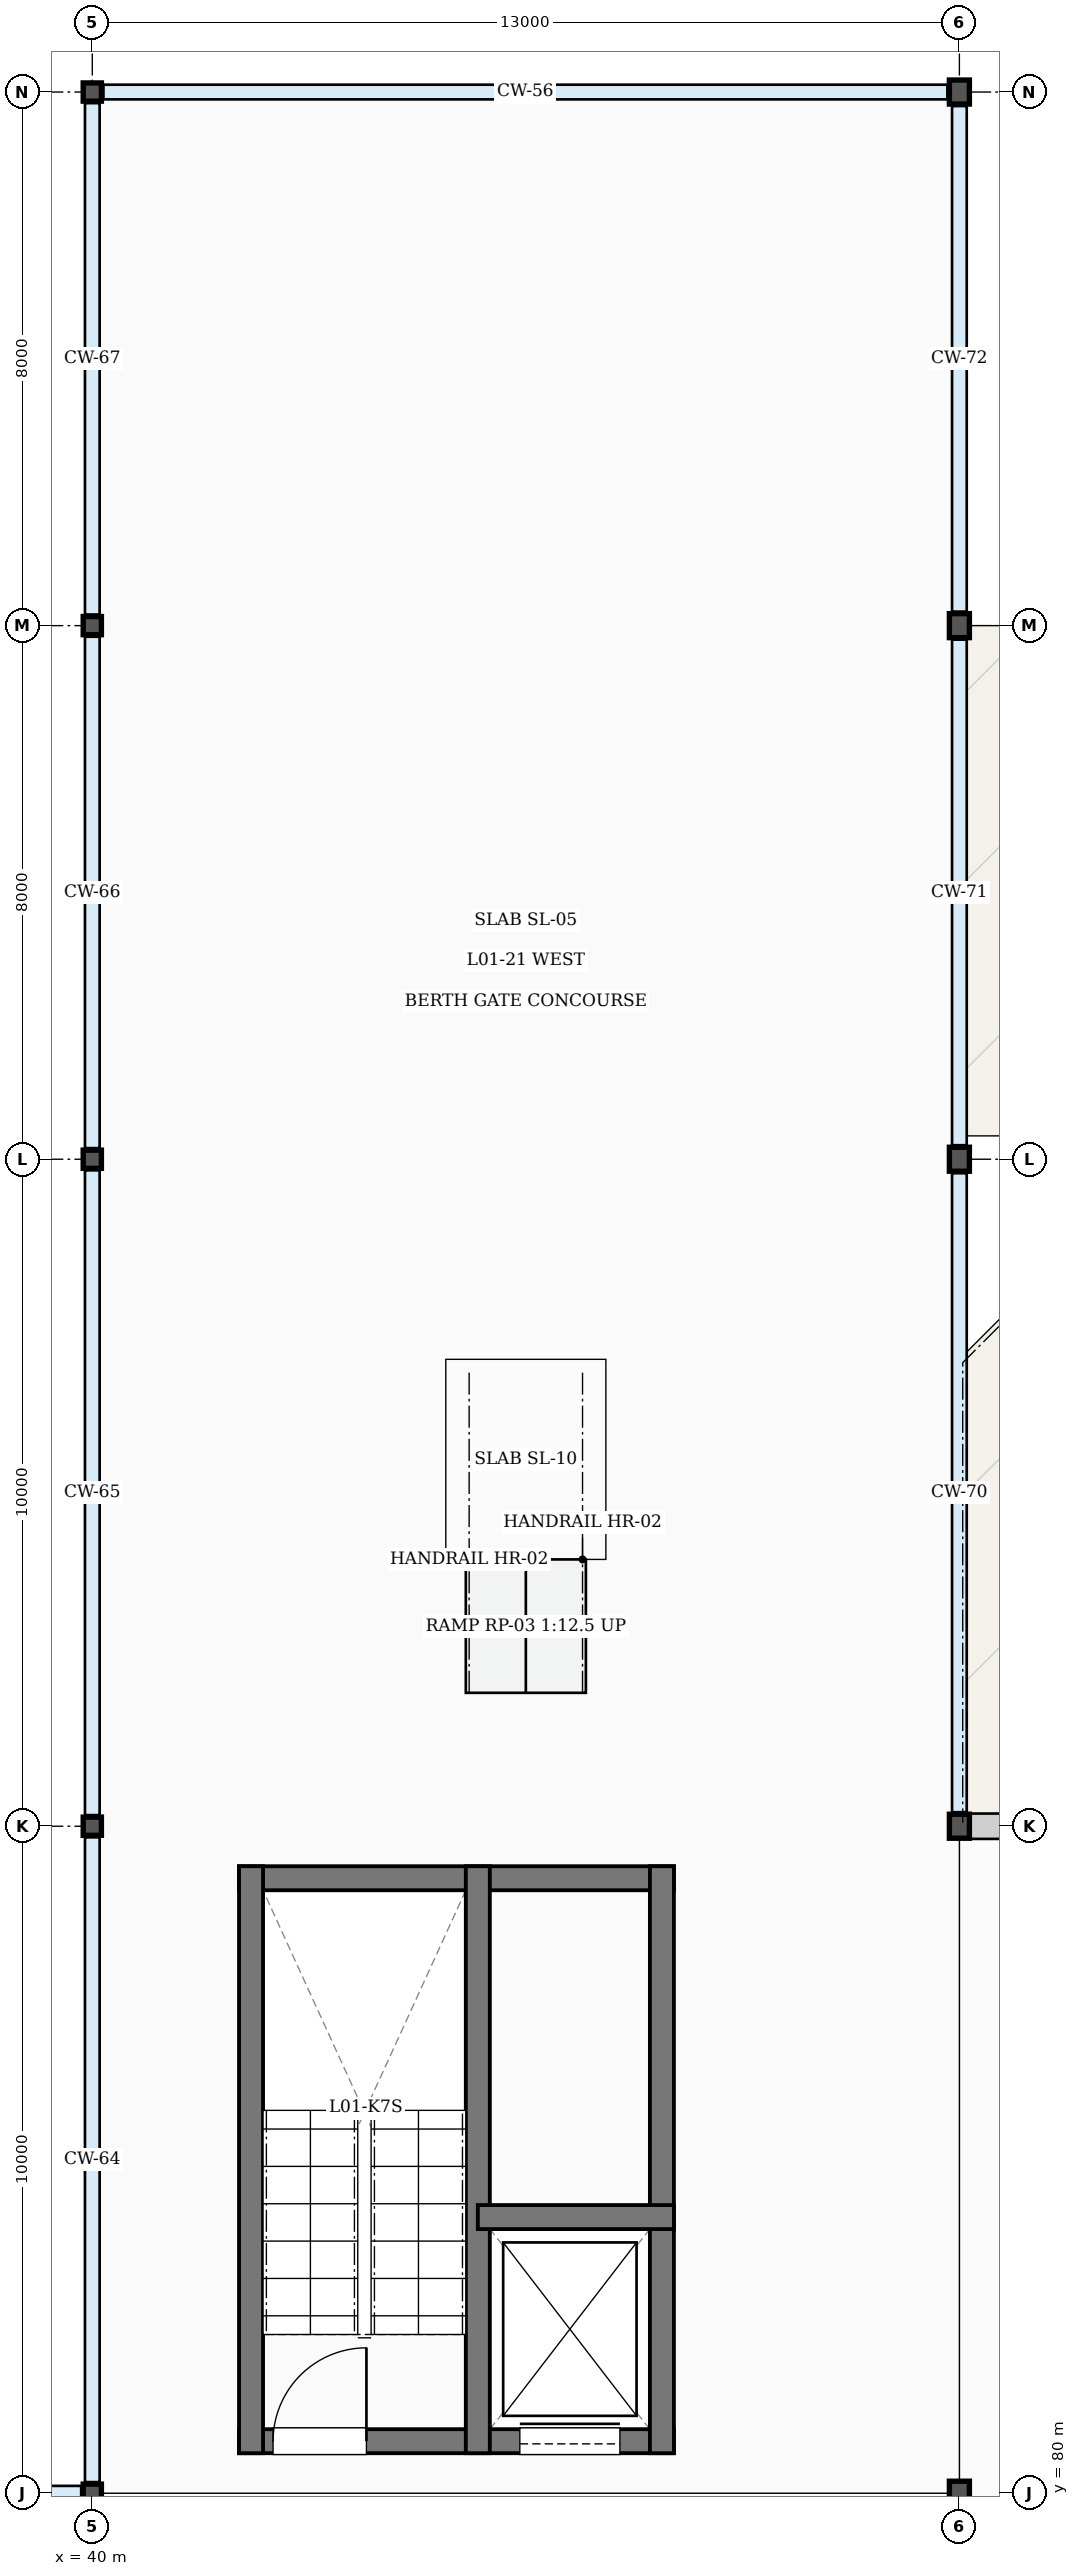
"""IFC4 building model, lengths in metres.
Left out: names, types, materials, properties, quantities, classifications, styles, units other than length and angle.
Written with IfcOpenShell. Run it as: python <this file> out.ifc"""

import sys

from ifc_helpers import new_model, si_unit, direction, frame, frame_2d, origin, origin_2d, place, context, subcontext, project, spatial, rectangle, hollow_circle, i_section, extrude, element, fill, save


model = new_model("IFC4")
c1 = context("Model", 3, precision=1e-05, world=origin(), true_north=direction((0.0, 1.0)))
c2 = subcontext(c1, "Body", "Model", "MODEL_VIEW")
j1 = project(units=[si_unit("LENGTHUNIT", "METRE"), si_unit("PLANEANGLEUNIT", "RADIAN")], contexts=[c1])
p1 = place(None, origin())
s1 = spatial("IfcSite", under=j1, at=p1, CompositionType="ELEMENT")
p2 = place(p1, origin())
s2 = spatial("IfcBuilding", under=s1, at=p2, CompositionType="ELEMENT")
p3 = place(p2, frame((0.0, 0.0, 5.4)))
s3 = spatial("IfcBuildingStorey", under=s2, at=p3, CompositionType="ELEMENT", Elevation=5.4)
for number, where, z_axis, x_axis in (
    (1, (40.0, 80.0, 0.0), (0.0, 0.0, 1.0), (1.0, 0.0, 0.0)),
    (2, (40.0, 90.0, 0.0), (0.0, 0.0, 1.0), (1.0, 0.0, 0.0)),
    (3, (40.0, 100.0, 0.0), (0.0, 0.0, 1.0), (1.0, 0.0, 0.0)),
    (4, (40.0, 108.0, 0.0), (0.0, 0.0, 1.0), (1.0, 0.0, 0.0)),
    (5, (40.0, 116.0, 0.0), (0.0, 0.0, 1.0), (1.0, 0.0, 0.0)),
):
    element("IfcColumn", number, at=place(p3, frame(where, z_axis=z_axis, x_axis=x_axis)), inside=s3, PredefinedType="COLUMN", context=c2, shape_type="SweptSolid", body=[
        extrude(hollow_circle(Radius=0.136, WallThickness=0.012, at=origin_2d()), origin(), (0.0, 0.0, 1.0), 4.8),
    ])
for number, where, z_axis, x_axis in (
    (6, (53.0, 80.0, 0.0), (0.0, 0.0, 1.0), (1.0, 0.0, 0.0)),
    (7, (53.0, 90.0, 0.0), (0.0, 0.0, 1.0), (1.0, 0.0, 0.0)),
    (8, (53.0, 100.0, 0.0), (0.0, 0.0, 1.0), (1.0, 0.0, 0.0)),
    (9, (53.0, 108.0, 0.0), (0.0, 0.0, 1.0), (1.0, 0.0, 0.0)),
    (10, (53.0, 116.0, 0.0), (0.0, 0.0, 1.0), (1.0, 0.0, 0.0)),
):
    element("IfcColumn", number, at=place(p3, frame(where, z_axis=z_axis, x_axis=x_axis)), inside=s3, PredefinedType="COLUMN", context=c2, shape_type="SweptSolid", body=[
        extrude(i_section(OverallWidth=0.3, OverallDepth=0.36, WebThickness=0.012, FlangeThickness=0.022, FilletRadius=0.027, at=origin_2d()), origin(), (0.0, 0.0, 1.0), 4.8),
    ])
p4 = place(p3, frame((53.15, 90.0, 0.0), z_axis=(0.0, 0.0, 1.0), x_axis=(1.0, 0.0, 0.0)))
e11 = element("IfcWall", 11, at=p4, inside=s3, PredefinedType="SOLIDWALL", context=c2, shape_type="SweptSolid", body=[
    extrude(rectangle(XDim=9.7, YDim=0.38, at=frame_2d((4.85, 0.0))), origin(), (0.0, 0.0, 1.0), 3.87),
])
p5 = place(p4, frame((3.95, 0.0, 0.0)))
e12 = element("IfcOpeningElement", 12, at=p5, cuts=e11, PredefinedType="OPENING", context=c2, shape_type="SweptSolid", body=[
    extrude(rectangle(XDim=1.8, YDim=2.35, at=frame_2d((0.9, 1.175))), frame((0.0, 0.2, 0.0), z_axis=(0.0, -1.0, 0.0), x_axis=(1.0, 0.0, 0.0)), (0.0, 0.0, 1.0), 0.4),
])
p6 = place(p3, frame((42.2, 80.78, 0.0), z_axis=(0.0, 0.0, 1.0), x_axis=(1.0, 0.0, 0.0)))
e13 = element("IfcWall", 13, at=p6, inside=s3, PredefinedType="SHEAR", context=c2, shape_type="SweptSolid", body=[
    extrude(rectangle(XDim=6.52, YDim=0.36, at=frame_2d((3.26, 0.0))), origin(), (0.0, 0.0, 1.0), 4.8),
])
p7 = place(p6, frame((0.51, 0.0, 0.0)))
e14 = element("IfcOpeningElement", 14, at=p7, cuts=e13, PredefinedType="OPENING", context=c2, shape_type="SweptSolid", body=[
    extrude(rectangle(XDim=1.4, YDim=2.35, at=frame_2d((0.7, 1.175))), frame((0.0, 0.19, 0.0), z_axis=(0.0, -1.0, 0.0), x_axis=(1.0, 0.0, 0.0)), (0.0, 0.0, 1.0), 0.38),
])
p8 = place(p6, frame((4.21, 0.0, 0.0)))
e15 = element("IfcOpeningElement", 15, at=p8, cuts=e13, PredefinedType="OPENING", context=c2, shape_type="SweptSolid", body=[
    extrude(rectangle(XDim=1.5, YDim=2.4, at=frame_2d((0.75, 1.2))), frame((0.0, 0.19, 0.0), z_axis=(0.0, -1.0, 0.0), x_axis=(1.0, 0.0, 0.0)), (0.0, 0.0, 1.0), 0.38),
])
p9 = place(p3, frame((42.2, 89.22, 0.0), z_axis=(0.0, 0.0, 1.0), x_axis=(1.0, 0.0, 0.0)))
e16 = element("IfcWall", 16, at=p9, inside=s3, PredefinedType="SHEAR", context=c2, shape_type="SweptSolid", body=[
    extrude(rectangle(XDim=6.52, YDim=0.36, at=frame_2d((3.26, 0.0))), origin(), (0.0, 0.0, 1.0), 4.8),
])
for number, where, z_axis, x_axis in (
    (17, (42.38, 80.6, 0.0), (0.0, 0.0, 1.0), (0.0, 1.0, 0.0)),
    (18, (48.54, 80.6, 0.0), (0.0, 0.0, 1.0), (0.0, 1.0, 0.0)),
    (19, (45.78, 80.6, 0.0), (0.0, 0.0, 1.0), (0.0, 1.0, 0.0)),
):
    element("IfcWall", number, at=place(p3, frame(where, z_axis=z_axis, x_axis=x_axis)), inside=s3, PredefinedType="SHEAR", context=c2, shape_type="SweptSolid", body=[
        extrude(rectangle(XDim=8.8, YDim=0.36, at=frame_2d((4.4, 0.0))), origin(), (0.0, 0.0, 1.0), 4.8),
    ])
p10 = place(p3, frame((45.78, 84.14, 0.0), z_axis=(0.0, 0.0, 1.0), x_axis=(1.0, 0.0, 0.0)))
e20 = element("IfcWall", 20, at=p10, inside=s3, PredefinedType="SHEAR", context=c2, shape_type="SweptSolid", body=[
    extrude(rectangle(XDim=2.94, YDim=0.36, at=frame_2d((1.47, 0.0))), origin(), (0.0, 0.0, 1.0), 4.8),
])
p11 = place(p7, origin())
e21 = element("IfcDoor", 21, at=p11, inside=s3, OperationType="SINGLE_SWING_RIGHT", PredefinedType="DOOR", context=c2, shape_type="SweptSolid", body=[
    extrude(rectangle(XDim=1.4, YDim=2.35, at=frame_2d((0.7, 1.175))), frame((0.0, 0.025, 0.0), z_axis=(0.0, -1.0, 0.0), x_axis=(1.0, 0.0, 0.0)), (0.0, 0.0, 1.0), 0.05),
])
fill(e14, e21)
p12 = place(p8, origin())
e22 = element("IfcDoor", 22, at=p12, inside=s3, OperationType="SLIDING_TO_LEFT", PredefinedType="DOOR", context=c2, shape_type="SweptSolid", body=[
    extrude(rectangle(XDim=1.5, YDim=2.4, at=frame_2d((0.75, 1.2))), frame((0.0, 0.025, 0.0), z_axis=(0.0, -1.0, 0.0), x_axis=(1.0, 0.0, 0.0)), (0.0, 0.0, 1.0), 0.05),
])
fill(e15, e22)
save(model, sys.argv[1])
